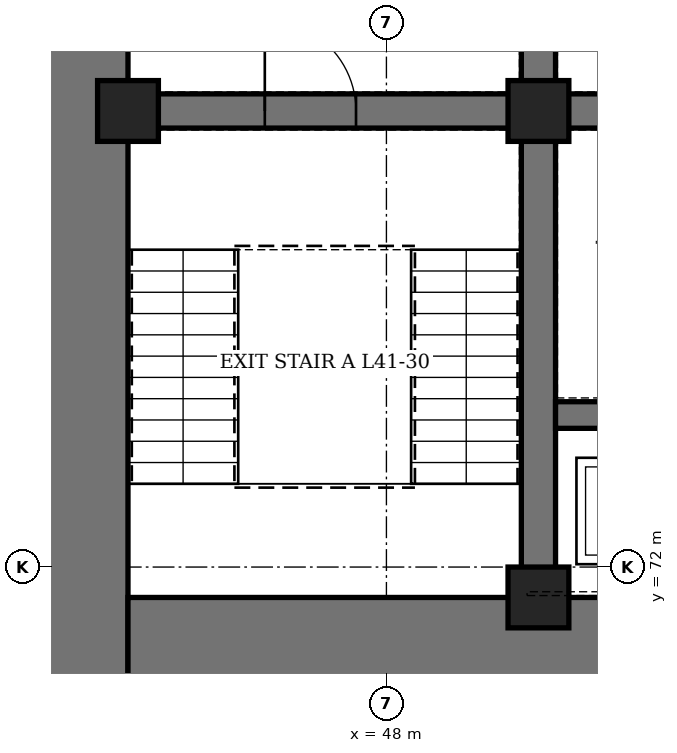
"""IFC4 building model, lengths in metres.
Left out: names, types, materials, properties, quantities, classifications, styles, units other than length and angle.
Written with IfcOpenShell. Run it as: python <this file> out.ifc"""

import sys

from ifc_helpers import new_model, si_unit, direction, frame, frame_2d, origin, origin_2d, place, context, subcontext, project, spatial, rectangle, hollow_rectangle, extrude, element, fill, save


model = new_model("IFC4")
c1 = context("Model", 3, precision=1e-05, world=origin(), true_north=direction((0.0, 1.0)))
c2 = subcontext(c1, "Body", "Model", "MODEL_VIEW")
j1 = project(units=[si_unit("LENGTHUNIT", "METRE"), si_unit("PLANEANGLEUNIT", "RADIAN")], contexts=[c1])
p1 = place(None, origin())
s1 = spatial("IfcSite", under=j1, at=p1, CompositionType="ELEMENT")
p2 = place(p1, origin())
s2 = spatial("IfcBuilding", under=s1, at=p2, CompositionType="ELEMENT")
p3 = place(p2, frame((0.0, 0.0, 185.5)))
s3 = spatial("IfcBuildingStorey", under=s2, at=p3, CompositionType="ELEMENT", Elevation=185.5)
p4 = place(p3, frame((44.0, 70.4, 0.0), z_axis=(0.0, 0.0, 1.0), x_axis=(0.0, 1.0, 0.0)))
e1 = element("IfcWall", 1, at=p4, inside=s3, PredefinedType="SHEAR", context=c2, shape_type="SweptSolid", body=[
    extrude(rectangle(XDim=19.2, YDim=1.2, at=frame_2d((9.6, 0.0))), origin(), (0.0, 0.0, 1.0), 4.2),
])
p5 = place(p4, frame((8.6, 0.0, 0.0)))
e2 = element("IfcOpeningElement", 2, at=p5, cuts=e1, PredefinedType="OPENING", context=c2, shape_type="SweptSolid", body=[
    extrude(rectangle(XDim=2.0, YDim=2.4, at=frame_2d((1.0, 1.2))), frame((0.0, 0.61, 0.0), z_axis=(0.0, -1.0, 0.0), x_axis=(1.0, 0.0, 0.0)), (0.0, 0.0, 1.0), 1.22),
])
p6 = place(p3, frame((44.6, 71.0, 0.0), z_axis=(0.0, 0.0, 1.0), x_axis=(1.0, 0.0, 0.0)))
e3 = element("IfcWall", 3, at=p6, inside=s3, PredefinedType="SHEAR", context=c2, shape_type="SweptSolid", body=[
    extrude(rectangle(XDim=22.8, YDim=1.2, at=frame_2d((11.4, 0.0))), origin(), (0.0, 0.0, 1.0), 4.2),
])
p7 = place(p6, frame((6.35, 0.0, 0.0)))
e4 = element("IfcOpeningElement", 4, at=p7, cuts=e3, PredefinedType="OPENING", context=c2, shape_type="SweptSolid", body=[
    extrude(rectangle(XDim=1.1, YDim=2.2, at=frame_2d((0.55, 1.1))), frame((0.0, 0.61, 0.0), z_axis=(0.0, -1.0, 0.0), x_axis=(1.0, 0.0, 0.0)), (0.0, 0.0, 1.0), 1.22),
])
p8 = place(p6, frame((9.35, 0.0, 0.0)))
e5 = element("IfcOpeningElement", 5, at=p8, cuts=e3, PredefinedType="OPENING", context=c2, shape_type="SweptSolid", body=[
    extrude(rectangle(XDim=1.1, YDim=2.2, at=frame_2d((0.55, 1.1))), frame((0.0, 0.61, 0.0), z_axis=(0.0, -1.0, 0.0), x_axis=(1.0, 0.0, 0.0)), (0.0, 0.0, 1.0), 1.22),
])
p9 = place(p6, frame((12.35, 0.0, 0.0)))
e6 = element("IfcOpeningElement", 6, at=p9, cuts=e3, PredefinedType="OPENING", context=c2, shape_type="SweptSolid", body=[
    extrude(rectangle(XDim=1.1, YDim=2.2, at=frame_2d((0.55, 1.1))), frame((0.0, 0.61, 0.0), z_axis=(0.0, -1.0, 0.0), x_axis=(1.0, 0.0, 0.0)), (0.0, 0.0, 1.0), 1.22),
])
p10 = place(p6, frame((15.35, 0.0, 0.0)))
e7 = element("IfcOpeningElement", 7, at=p10, cuts=e3, PredefinedType="OPENING", context=c2, shape_type="SweptSolid", body=[
    extrude(rectangle(XDim=1.1, YDim=2.2, at=frame_2d((0.55, 1.1))), frame((0.0, 0.61, 0.0), z_axis=(0.0, -1.0, 0.0), x_axis=(1.0, 0.0, 0.0)), (0.0, 0.0, 1.0), 1.22),
])
p11 = place(p3, frame((50.0, 71.6, 0.0), z_axis=(0.0, 0.0, 1.0), x_axis=(0.0, 1.0, 0.0)))
e8 = element("IfcWall", 8, at=p11, inside=s3, PredefinedType="SHEAR", context=c2, shape_type="SweptSolid", body=[
    extrude(rectangle(XDim=16.8, YDim=0.45, at=frame_2d((8.4, 0.0))), origin(), (0.0, 0.0, 1.0), 4.2),
])
p12 = place(p11, frame((7.5, 0.0, 0.0)))
e9 = element("IfcOpeningElement", 9, at=p12, cuts=e8, PredefinedType="OPENING", context=c2, shape_type="SweptSolid", body=[
    extrude(rectangle(XDim=1.8, YDim=2.4, at=frame_2d((0.9, 1.2))), frame((0.0, 0.235, 0.0), z_axis=(0.0, -1.0, 0.0), x_axis=(1.0, 0.0, 0.0)), (0.0, 0.0, 1.0), 0.47),
])
p13 = place(p3, frame((44.6, 78.0, 0.0), z_axis=(0.0, 0.0, 1.0), x_axis=(1.0, 0.0, 0.0)))
e10 = element("IfcWall", 10, at=p13, inside=s3, PredefinedType="SHEAR", context=c2, shape_type="SweptSolid", body=[
    extrude(rectangle(XDim=5.175, YDim=0.45, at=frame_2d((2.587, 0.0))), origin(), (0.0, 0.0, 1.0), 4.2),
])
p14 = place(p13, frame((1.8, 0.0, 0.0)))
e11 = element("IfcOpeningElement", 11, at=p14, cuts=e10, PredefinedType="OPENING", context=c2, shape_type="SweptSolid", body=[
    extrude(rectangle(XDim=1.2, YDim=2.1, at=frame_2d((0.6, 1.05))), frame((0.0, 0.235, 0.0), z_axis=(0.0, -1.0, 0.0), x_axis=(1.0, 0.0, 0.0)), (0.0, 0.0, 1.0), 0.47),
])
p15 = place(p3, frame((50.225, 78.0, 0.0), z_axis=(0.0, 0.0, 1.0), x_axis=(1.0, 0.0, 0.0)))
e12 = element("IfcWall", 12, at=p15, inside=s3, PredefinedType="SHEAR", context=c2, shape_type="SweptSolid", body=[
    extrude(rectangle(XDim=11.55, YDim=0.45, at=frame_2d((5.775, 0.0))), origin(), (0.0, 0.0, 1.0), 4.2),
])
p16 = place(p15, frame((0.825, 0.0, 0.0)))
e13 = element("IfcOpeningElement", 13, at=p16, cuts=e12, PredefinedType="OPENING", context=c2, shape_type="SweptSolid", body=[
    extrude(rectangle(XDim=0.9, YDim=2.1, at=frame_2d((0.45, 1.05))), frame((0.0, 0.235, 0.0), z_axis=(0.0, -1.0, 0.0), x_axis=(1.0, 0.0, 0.0)), (0.0, 0.0, 1.0), 0.47),
])
p17 = place(p15, frame((3.825, 0.0, 0.0)))
e14 = element("IfcOpeningElement", 14, at=p17, cuts=e12, PredefinedType="OPENING", context=c2, shape_type="SweptSolid", body=[
    extrude(rectangle(XDim=0.9, YDim=2.1, at=frame_2d((0.45, 1.05))), frame((0.0, 0.235, 0.0), z_axis=(0.0, -1.0, 0.0), x_axis=(1.0, 0.0, 0.0)), (0.0, 0.0, 1.0), 0.47),
])
p18 = place(p15, frame((6.825, 0.0, 0.0)))
e15 = element("IfcOpeningElement", 15, at=p18, cuts=e12, PredefinedType="OPENING", context=c2, shape_type="SweptSolid", body=[
    extrude(rectangle(XDim=0.9, YDim=2.1, at=frame_2d((0.45, 1.05))), frame((0.0, 0.235, 0.0), z_axis=(0.0, -1.0, 0.0), x_axis=(1.0, 0.0, 0.0)), (0.0, 0.0, 1.0), 0.47),
])
p19 = place(p15, frame((9.825, 0.0, 0.0)))
e16 = element("IfcOpeningElement", 16, at=p19, cuts=e12, PredefinedType="OPENING", context=c2, shape_type="SweptSolid", body=[
    extrude(rectangle(XDim=0.9, YDim=2.1, at=frame_2d((0.45, 1.05))), frame((0.0, 0.235, 0.0), z_axis=(0.0, -1.0, 0.0), x_axis=(1.0, 0.0, 0.0)), (0.0, 0.0, 1.0), 0.47),
])
p20 = place(p3, frame((50.225, 74.0, 0.0), z_axis=(0.0, 0.0, 1.0), x_axis=(1.0, 0.0, 0.0)))
e17 = element("IfcWall", 17, at=p20, inside=s3, PredefinedType="SHEAR", context=c2, shape_type="SweptSolid", body=[
    extrude(rectangle(XDim=11.55, YDim=0.35, at=frame_2d((5.775, 0.0))), origin(), (0.0, 0.0, 1.0), 4.2),
])
for number, where, z_axis, x_axis in (
    (18, (44.6, 78.0, 0.0), (0.0, 0.0, 1.0), (1.0, 0.0, 0.0)),
    (19, (50.0, 71.6, 0.0), (0.0, 0.0, 1.0), (1.0, 0.0, 0.0)),
    (20, (50.0, 78.0, 0.0), (0.0, 0.0, 1.0), (1.0, 0.0, 0.0)),
):
    element("IfcColumn", number, at=place(p3, frame(where, z_axis=z_axis, x_axis=x_axis)), inside=s3, PredefinedType="COLUMN", context=c2, shape_type="SweptSolid", body=[
        extrude(hollow_rectangle(XDim=0.8, YDim=0.8, WallThickness=0.1, at=origin_2d()), origin(), (0.0, 0.0, 1.0), 4.2),
    ])
p21 = place(p14, origin())
e21 = element("IfcDoor", 21, at=p21, inside=s3, OperationType="SINGLE_SWING_LEFT", PredefinedType="DOOR", context=c2, shape_type="SweptSolid", body=[
    extrude(rectangle(XDim=1.2, YDim=2.1, at=frame_2d((0.6, 1.05))), frame((0.0, 0.225, 0.0), z_axis=(0.0, -1.0, 0.0), x_axis=(1.0, 0.0, 0.0)), (0.0, 0.0, 1.0), 0.449),
])
fill(e11, e21)
save(model, sys.argv[1])
